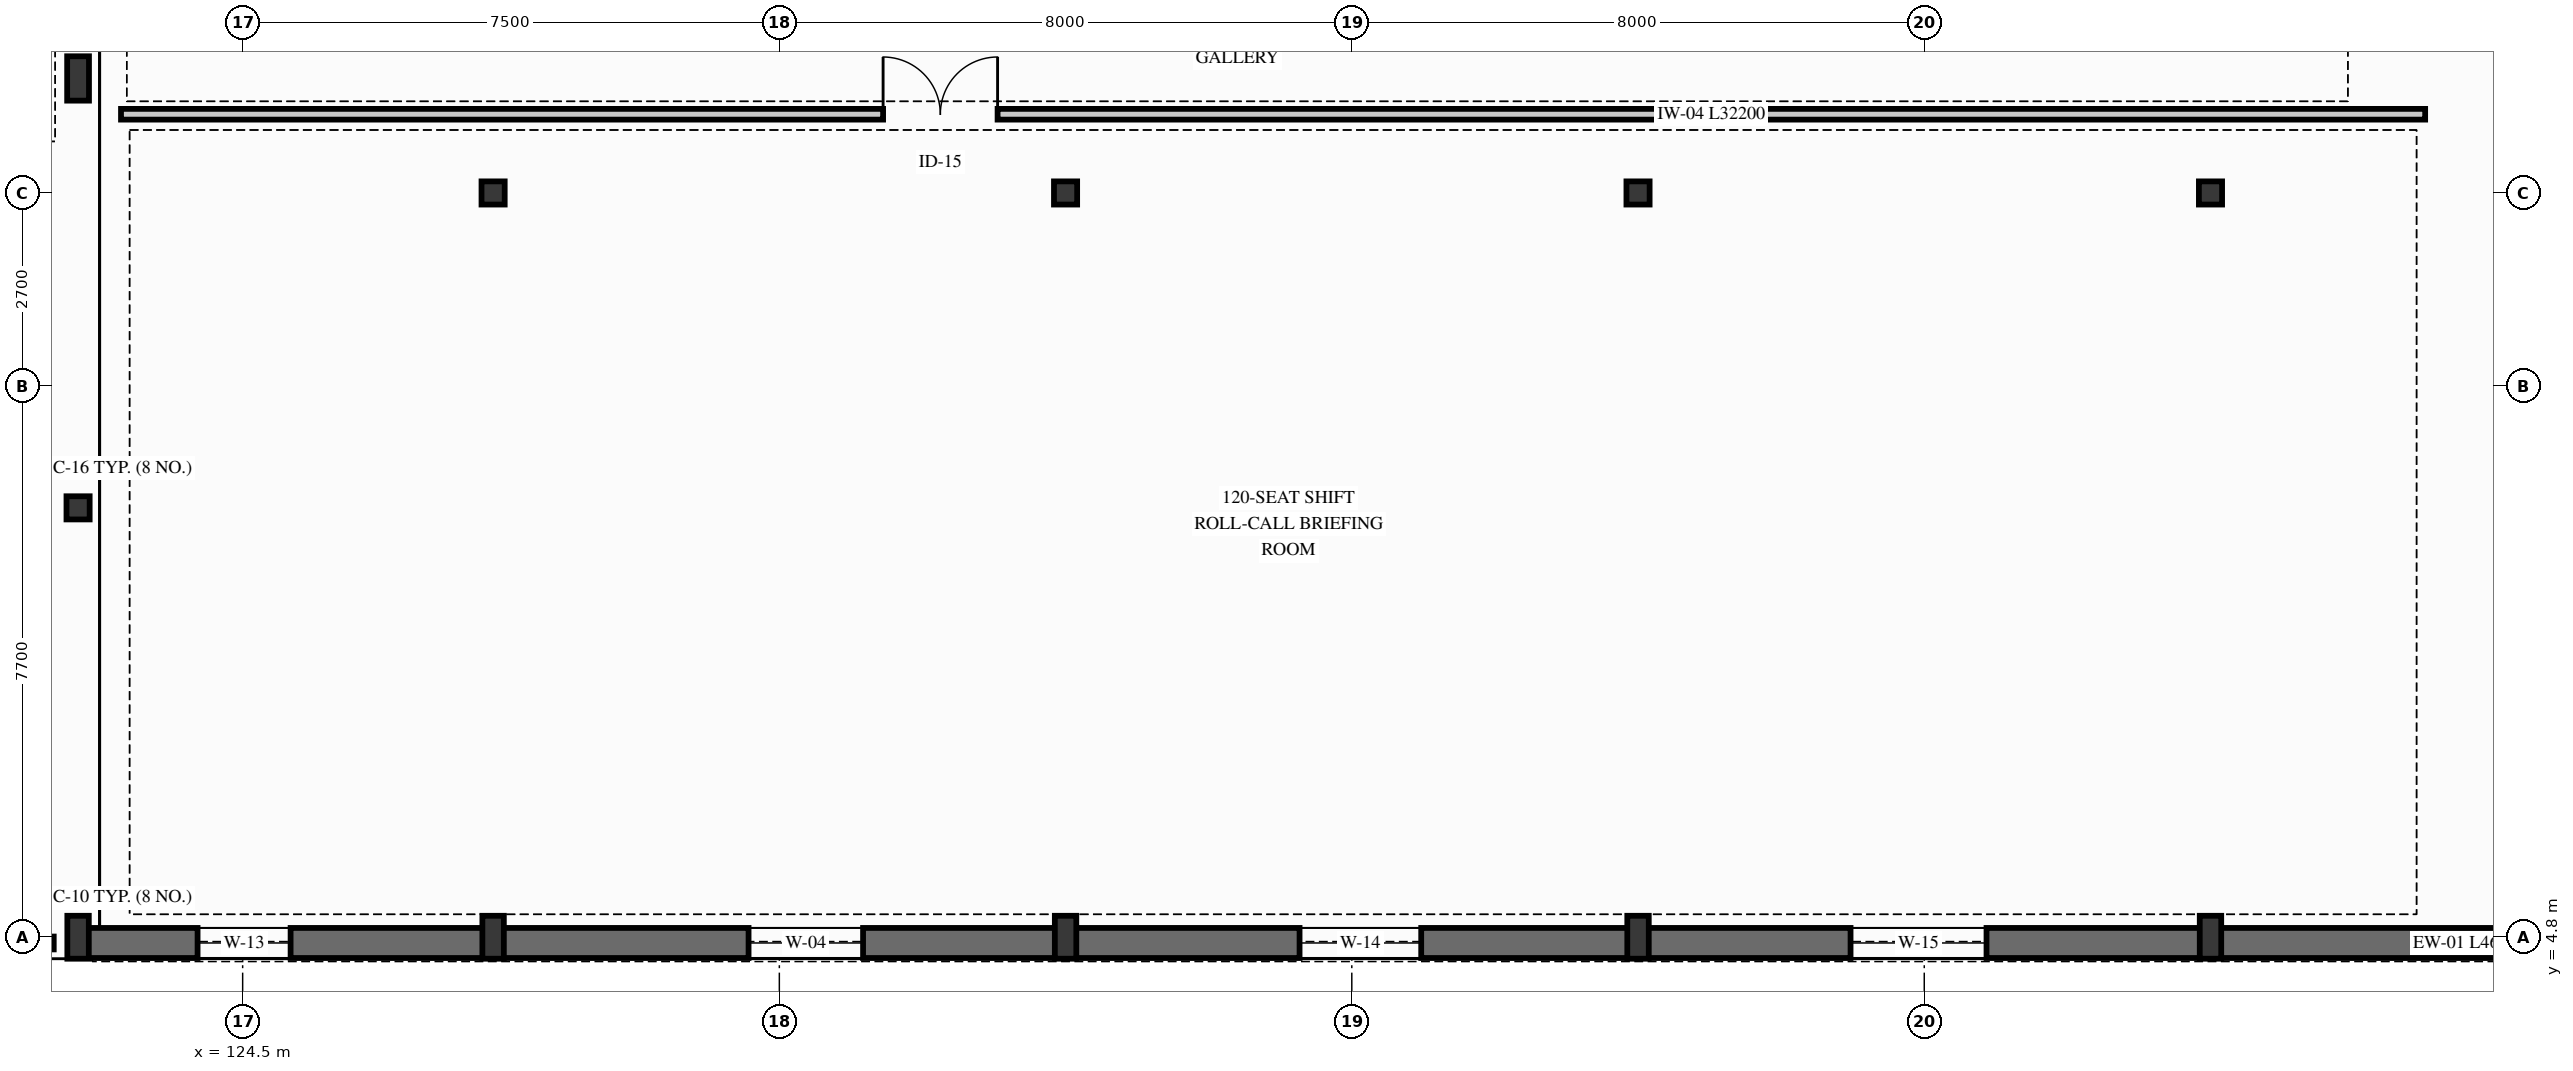
"""IFC4 building model, lengths in metres.
Left out: names, types, materials, properties, quantities, classifications, styles, units other than length and angle.
Written with IfcOpenShell. Run it as: python <this file> out.ifc"""

import sys

from ifc_helpers import new_model, si_unit, direction, frame, frame_2d, origin, origin_2d, place, context, subcontext, project, spatial, rectangle, hollow_circle, i_section, extrude, element, fill, save


model = new_model("IFC4")
c1 = context("Model", 3, precision=1e-05, world=origin(), true_north=direction((0.0, 1.0)))
c2 = subcontext(c1, "Body", "Model", "MODEL_VIEW")
j1 = project(units=[si_unit("LENGTHUNIT", "METRE"), si_unit("PLANEANGLEUNIT", "RADIAN")], contexts=[c1])
p1 = place(None, origin())
s1 = spatial("IfcSite", under=j1, at=p1, CompositionType="ELEMENT")
p2 = place(p1, origin())
s2 = spatial("IfcBuilding", under=s1, at=p2, CompositionType="ELEMENT")
p3 = place(p2, frame((0.0, 0.0, 5.1)))
s3 = spatial("IfcBuildingStorey", under=s2, at=p3, CompositionType="ELEMENT", Elevation=5.1)
p4 = place(p3, frame((122.2, 4.8, 0.0), z_axis=(0.0, 0.0, 1.0), x_axis=(1.0, 0.0, 0.0)))
e1 = element("IfcColumn", 1, at=p4, inside=s3, PredefinedType="COLUMN", context=c2, shape_type="SweptSolid", body=[
    extrude(i_section(OverallWidth=0.3, OverallDepth=0.6, WebThickness=0.015, FlangeThickness=0.03, FilletRadius=0.027, at=origin_2d()), origin(), (0.0, 0.0, 1.0), 3.92),
])
p5 = place(p3, frame((122.2, 10.8, 0.0), z_axis=(0.0, 0.0, 1.0), x_axis=(1.0, 0.0, 0.0)))
e2 = element("IfcColumn", 2, at=p5, inside=s3, PredefinedType="COLUMN", context=c2, shape_type="SweptSolid", body=[
    extrude(hollow_circle(Radius=0.162, WallThickness=0.016, at=origin_2d()), origin(), (0.0, 0.0, 1.0), 3.92),
])
p6 = place(p3, frame((122.2, 16.8, 0.0), z_axis=(0.0, 0.0, 1.0), x_axis=(1.0, 0.0, 0.0)))
e3 = element("IfcColumn", 3, at=p6, inside=s3, PredefinedType="COLUMN", context=c2, shape_type="SweptSolid", body=[
    extrude(i_section(OverallWidth=0.305, OverallDepth=0.62, WebThickness=0.021, FlangeThickness=0.04, FilletRadius=0.027, at=origin_2d()), origin(), (0.0, 0.0, 1.0), 3.92),
])
p7 = place(p3, frame((128.0, 4.8, 0.0), z_axis=(0.0, 0.0, 1.0), x_axis=(1.0, 0.0, 0.0)))
e4 = element("IfcColumn", 4, at=p7, inside=s3, PredefinedType="COLUMN", context=c2, shape_type="SweptSolid", body=[
    extrude(i_section(OverallWidth=0.3, OverallDepth=0.6, WebThickness=0.015, FlangeThickness=0.03, FilletRadius=0.027, at=origin_2d()), origin(), (0.0, 0.0, 1.0), 4.02),
])
p8 = place(p3, frame((128.0, 15.2, 0.0), z_axis=(0.0, 0.0, 1.0), x_axis=(1.0, 0.0, 0.0)))
e5 = element("IfcColumn", 5, at=p8, inside=s3, PredefinedType="COLUMN", context=c2, shape_type="SweptSolid", body=[
    extrude(hollow_circle(Radius=0.162, WallThickness=0.016, at=origin_2d()), origin(), (0.0, 0.0, 1.0), 4.02),
])
p9 = place(p3, frame((136.0, 4.8, 0.0), z_axis=(0.0, 0.0, 1.0), x_axis=(1.0, 0.0, 0.0)))
e6 = element("IfcColumn", 6, at=p9, inside=s3, PredefinedType="COLUMN", context=c2, shape_type="SweptSolid", body=[
    extrude(i_section(OverallWidth=0.3, OverallDepth=0.6, WebThickness=0.015, FlangeThickness=0.03, FilletRadius=0.027, at=origin_2d()), origin(), (0.0, 0.0, 1.0), 4.02),
])
p10 = place(p3, frame((136.0, 15.2, 0.0), z_axis=(0.0, 0.0, 1.0), x_axis=(1.0, 0.0, 0.0)))
e7 = element("IfcColumn", 7, at=p10, inside=s3, PredefinedType="COLUMN", context=c2, shape_type="SweptSolid", body=[
    extrude(hollow_circle(Radius=0.162, WallThickness=0.016, at=origin_2d()), origin(), (0.0, 0.0, 1.0), 4.02),
])
p11 = place(p3, frame((144.0, 4.8, 0.0), z_axis=(0.0, 0.0, 1.0), x_axis=(1.0, 0.0, 0.0)))
e8 = element("IfcColumn", 8, at=p11, inside=s3, PredefinedType="COLUMN", context=c2, shape_type="SweptSolid", body=[
    extrude(i_section(OverallWidth=0.3, OverallDepth=0.6, WebThickness=0.015, FlangeThickness=0.03, FilletRadius=0.027, at=origin_2d()), origin(), (0.0, 0.0, 1.0), 4.02),
])
p12 = place(p3, frame((144.0, 15.2, 0.0), z_axis=(0.0, 0.0, 1.0), x_axis=(1.0, 0.0, 0.0)))
e9 = element("IfcColumn", 9, at=p12, inside=s3, PredefinedType="COLUMN", context=c2, shape_type="SweptSolid", body=[
    extrude(hollow_circle(Radius=0.162, WallThickness=0.016, at=origin_2d()), origin(), (0.0, 0.0, 1.0), 4.02),
])
p13 = place(p3, frame((152.0, 4.8, 0.0), z_axis=(0.0, 0.0, 1.0), x_axis=(1.0, 0.0, 0.0)))
e10 = element("IfcColumn", 10, at=p13, inside=s3, PredefinedType="COLUMN", context=c2, shape_type="SweptSolid", body=[
    extrude(i_section(OverallWidth=0.3, OverallDepth=0.6, WebThickness=0.015, FlangeThickness=0.03, FilletRadius=0.027, at=origin_2d()), origin(), (0.0, 0.0, 1.0), 4.02),
])
p14 = place(p3, frame((152.0, 15.2, 0.0), z_axis=(0.0, 0.0, 1.0), x_axis=(1.0, 0.0, 0.0)))
e11 = element("IfcColumn", 11, at=p14, inside=s3, PredefinedType="COLUMN", context=c2, shape_type="SweptSolid", body=[
    extrude(hollow_circle(Radius=0.162, WallThickness=0.016, at=origin_2d()), origin(), (0.0, 0.0, 1.0), 4.02),
])
p15 = place(p3, frame((122.22, 4.72, 0.0), z_axis=(0.0, 0.0, 1.0), x_axis=(1.0, 0.0, 0.0)))
e12 = element("IfcWall", 12, at=p15, inside=s3, PredefinedType="SOLIDWALL", context=c2, shape_type="SweptSolid", body=[
    extrude(rectangle(XDim=46.06, YDim=0.42, at=frame_2d((23.03, 0.0))), origin(), (0.0, 0.0, 1.0), 3.94),
])
p16 = place(p15, frame((1.65, 0.0, 0.85)))
e13 = element("IfcOpeningElement", 13, at=p16, cuts=e12, PredefinedType="OPENING", context=c2, shape_type="SweptSolid", body=[
    extrude(rectangle(XDim=1.3, YDim=2.15, at=frame_2d((0.65, 1.075))), frame((0.0, 0.22, 0.0), z_axis=(0.0, -1.0, 0.0), x_axis=(1.0, 0.0, 0.0)), (0.0, 0.0, 1.0), 0.44),
])
p17 = place(p15, frame((9.35, 0.0, 0.85)))
e14 = element("IfcOpeningElement", 14, at=p17, cuts=e12, PredefinedType="OPENING", context=c2, shape_type="SweptSolid", body=[
    extrude(rectangle(XDim=1.6, YDim=2.4, at=frame_2d((0.8, 1.2))), frame((0.0, 0.22, 0.0), z_axis=(0.0, -1.0, 0.0), x_axis=(1.0, 0.0, 0.0)), (0.0, 0.0, 1.0), 0.44),
])
p18 = place(p15, frame((17.05, 0.0, 0.85)))
e15 = element("IfcOpeningElement", 15, at=p18, cuts=e12, PredefinedType="OPENING", context=c2, shape_type="SweptSolid", body=[
    extrude(rectangle(XDim=1.7, YDim=2.35, at=frame_2d((0.85, 1.175))), frame((0.0, 0.22, 0.0), z_axis=(0.0, -1.0, 0.0), x_axis=(1.0, 0.0, 0.0)), (0.0, 0.0, 1.0), 0.44),
])
p19 = place(p15, frame((24.75, 0.0, 0.85)))
e16 = element("IfcOpeningElement", 16, at=p19, cuts=e12, PredefinedType="OPENING", context=c2, shape_type="SweptSolid", body=[
    extrude(rectangle(XDim=1.9, YDim=2.45, at=frame_2d((0.95, 1.225))), frame((0.0, 0.22, 0.0), z_axis=(0.0, -1.0, 0.0), x_axis=(1.0, 0.0, 0.0)), (0.0, 0.0, 1.0), 0.44),
])
p20 = place(p15, frame((40.15, 0.0, 0.77)))
e17 = element("IfcOpeningElement", 17, at=p20, cuts=e12, PredefinedType="OPENING", context=c2, shape_type="SweptSolid", body=[
    extrude(rectangle(XDim=2.3, YDim=2.55, at=frame_2d((1.15, 1.275))), frame((0.0, 0.22, 0.0), z_axis=(0.0, -1.0, 0.0), x_axis=(1.0, 0.0, 0.0)), (0.0, 0.0, 1.0), 0.44),
])
p21 = place(p3, frame((122.8, 16.3, 0.0), z_axis=(0.0, 0.0, 1.0), x_axis=(1.0, 0.0, 0.0)))
e18 = element("IfcWall", 18, at=p21, inside=s3, PredefinedType="PARTITIONING", context=c2, shape_type="SweptSolid", body=[
    extrude(rectangle(XDim=32.2, YDim=0.15, at=frame_2d((16.1, 0.0))), origin(), (0.0, 0.0, 1.0), 3.92),
])
p22 = place(p21, frame((10.65, 0.0, 0.0)))
e19 = element("IfcOpeningElement", 19, at=p22, cuts=e18, PredefinedType="OPENING", context=c2, shape_type="SweptSolid", body=[
    extrude(rectangle(XDim=1.6, YDim=2.3, at=frame_2d((0.8, 1.15))), frame((0.0, 0.085, 0.0), z_axis=(0.0, -1.0, 0.0), x_axis=(1.0, 0.0, 0.0)), (0.0, 0.0, 1.0), 0.17),
])
p23 = place(p16, origin())
e20 = element("IfcWindow", 20, at=p23, inside=s3, PartitioningType="SINGLE_PANEL", PredefinedType="WINDOW", context=c2, shape_type="SweptSolid", body=[
    extrude(rectangle(XDim=1.3, YDim=2.15, at=frame_2d((0.65, 1.075))), frame((0.0, 0.03, 0.0), z_axis=(0.0, -1.0, 0.0), x_axis=(1.0, 0.0, 0.0)), (0.0, 0.0, 1.0), 0.06),
])
fill(e13, e20)
p24 = place(p17, origin())
e21 = element("IfcWindow", 21, at=p24, inside=s3, PartitioningType="SINGLE_PANEL", PredefinedType="WINDOW", context=c2, shape_type="SweptSolid", body=[
    extrude(rectangle(XDim=1.6, YDim=2.4, at=frame_2d((0.8, 1.2))), frame((0.0, 0.03, 0.0), z_axis=(0.0, -1.0, 0.0), x_axis=(1.0, 0.0, 0.0)), (0.0, 0.0, 1.0), 0.06),
])
fill(e14, e21)
p25 = place(p18, origin())
e22 = element("IfcWindow", 22, at=p25, inside=s3, PartitioningType="SINGLE_PANEL", PredefinedType="WINDOW", context=c2, shape_type="SweptSolid", body=[
    extrude(rectangle(XDim=1.7, YDim=2.35, at=frame_2d((0.85, 1.175))), frame((0.0, 0.03, 0.0), z_axis=(0.0, -1.0, 0.0), x_axis=(1.0, 0.0, 0.0)), (0.0, 0.0, 1.0), 0.06),
])
fill(e15, e22)
p26 = place(p19, origin())
e23 = element("IfcWindow", 23, at=p26, inside=s3, PartitioningType="SINGLE_PANEL", PredefinedType="WINDOW", context=c2, shape_type="SweptSolid", body=[
    extrude(rectangle(XDim=1.9, YDim=2.45, at=frame_2d((0.95, 1.225))), frame((0.0, 0.03, 0.0), z_axis=(0.0, -1.0, 0.0), x_axis=(1.0, 0.0, 0.0)), (0.0, 0.0, 1.0), 0.06),
])
fill(e16, e23)
p27 = place(p3, frame((150.9, 23.892, 8.078), z_axis=(0.0, -0.199981279516, 0.97979971823), x_axis=(0.661396752187, -0.734885280208, -0.14999320361)))
p28 = place(p27, frame((-2.074, -20.703, 0.0)))
p29 = place(p28, frame((0.0, 0.0, 0.02)))
e24 = element("IfcWindow", 24, at=p29, inside=s3, PartitioningType="SINGLE_PANEL", PredefinedType="SKYLIGHT", context=c2, shape_type="SweptSolid", body=[
    extrude(rectangle(XDim=1.2, YDim=1.2, at=origin_2d()), origin(), (0.0, 0.0, 1.0), 0.08),
])
p30 = place(p27, frame((11.154, -5.703, 0.0)))
p31 = place(p30, frame((0.0, 0.0, 0.02)))
e25 = element("IfcWindow", 25, at=p31, inside=s3, PartitioningType="SINGLE_PANEL", PredefinedType="SKYLIGHT", context=c2, shape_type="SweptSolid", body=[
    extrude(rectangle(XDim=1.4, YDim=1.4, at=origin_2d()), origin(), (0.0, 0.0, 1.0), 0.08),
])
p32 = place(p22, origin())
e26 = element("IfcDoor", 26, at=p32, inside=s3, OperationType="DOUBLE_DOOR_SINGLE_SWING", PredefinedType="DOOR", context=c2, shape_type="SweptSolid", body=[
    extrude(rectangle(XDim=1.6, YDim=2.3, at=frame_2d((0.8, 1.15))), frame((0.0, 0.025, 0.0), z_axis=(0.0, -1.0, 0.0), x_axis=(1.0, 0.0, 0.0)), (0.0, 0.0, 1.0), 0.05),
])
fill(e19, e26)
save(model, sys.argv[1])
